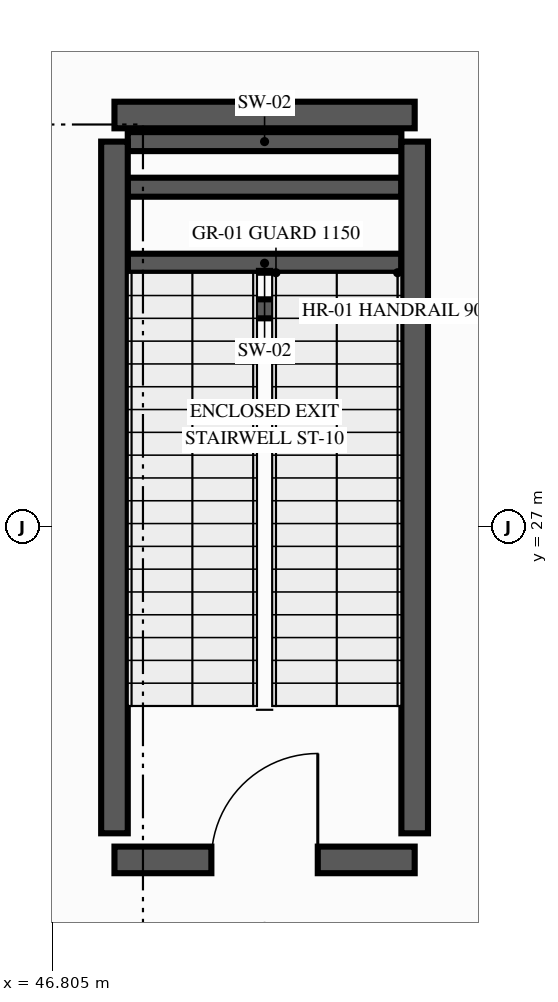
"""IFC4 building model, lengths in metres.
Left out: names, types, materials, properties, quantities, classifications, styles, units other than length and angle.
Written with IfcOpenShell. Run it as: python <this file> out.ifc"""

import sys

from ifc_helpers import new_model, si_unit, direction, frame, frame_2d, origin, place, context, subcontext, project, spatial, rectangle, extrude, element, fill, save


model = new_model("IFC4")
c1 = context("Model", 3, precision=1e-05, world=origin(), true_north=direction((0.0, 1.0)))
c2 = subcontext(c1, "Body", "Model", "MODEL_VIEW")
j1 = project(units=[si_unit("LENGTHUNIT", "METRE"), si_unit("PLANEANGLEUNIT", "RADIAN")], contexts=[c1])
p1 = place(None, origin())
s1 = spatial("IfcSite", under=j1, at=p1, CompositionType="ELEMENT")
p2 = place(p1, origin())
s2 = spatial("IfcBuilding", under=s1, at=p2, CompositionType="ELEMENT")
p3 = place(p2, frame((0.0, 0.0, -6.0)))
s3 = spatial("IfcBuildingStorey", under=s2, at=p3, CompositionType="ELEMENT", Elevation=-6.0)
for number, where, z_axis, x_axis in (
    (1, (47.8, 30.475, 0.0), (0.0, 0.0, 1.0), (1.0, 0.0, 0.0)),
    (2, (47.8, 32.075, 0.0), (0.0, 0.0, 1.0), (1.0, 0.0, 0.0)),
):
    element("IfcWall", number, at=place(p3, frame(where, z_axis=z_axis, x_axis=x_axis)), inside=s3, PredefinedType="SHEAR", context=c2, shape_type="SweptSolid", body=[
        extrude(rectangle(XDim=3.6, YDim=0.25, at=frame_2d((1.8, 0.0))), origin(), (0.0, 0.0, 1.0), 2.8),
    ])
for number, where, z_axis, x_axis in (
    (3, (47.8, 29.875, 0.0), (0.0, 0.0, 1.0), (1.0, 0.0, 0.0)),
    (4, (47.8, 31.475, 0.0), (0.0, 0.0, 1.0), (1.0, 0.0, 0.0)),
):
    element("IfcWall", number, at=place(p3, frame(where, z_axis=z_axis, x_axis=x_axis)), inside=s3, PredefinedType="SHEAR", context=c2, shape_type="SweptSolid", body=[
        extrude(rectangle(XDim=3.6, YDim=0.25, at=frame_2d((1.8, 0.0))), origin(), (0.0, 0.0, 1.0), 5.7),
    ])
p4 = place(p3, frame((47.625, 22.625, 0.0), z_axis=(0.0, 0.0, 1.0), x_axis=(1.0, 0.0, 0.0)))
e5 = element("IfcWall", 5, at=p4, inside=s3, PredefinedType="SHEAR", context=c2, shape_type="SweptSolid", body=[
    extrude(rectangle(XDim=3.95, YDim=0.35, at=frame_2d((1.975, 0.0))), origin(), (0.0, 0.0, 1.0), 5.7),
])
p5 = place(p4, frame((1.275, 0.0, 0.0)))
e6 = element("IfcOpeningElement", 6, at=p5, cuts=e5, PredefinedType="OPENING", context=c2, shape_type="SweptSolid", body=[
    extrude(rectangle(XDim=1.4, YDim=2.2, at=frame_2d((0.7, 1.1))), frame((0.0, 0.185, 0.0), z_axis=(0.0, -1.0, 0.0), x_axis=(1.0, 0.0, 0.0)), (0.0, 0.0, 1.0), 0.37),
])
p6 = place(p3, frame((47.625, 32.425, 0.0), z_axis=(0.0, 0.0, 1.0), x_axis=(1.0, 0.0, 0.0)))
e7 = element("IfcWall", 7, at=p6, inside=s3, PredefinedType="SHEAR", context=c2, shape_type="SweptSolid", body=[
    extrude(rectangle(XDim=3.95, YDim=0.35, at=frame_2d((1.975, 0.0))), origin(), (0.0, 0.0, 1.0), 5.7),
])
for number, where, z_axis, x_axis in (
    (8, (47.625, 22.975, 0.0), (0.0, 0.0, 1.0), (0.0, 1.0, 0.0)),
    (9, (51.575, 22.975, 0.0), (0.0, 0.0, 1.0), (0.0, 1.0, 0.0)),
):
    element("IfcWall", number, at=place(p3, frame(where, z_axis=z_axis, x_axis=x_axis)), inside=s3, PredefinedType="SHEAR", context=c2, shape_type="SweptSolid", body=[
        extrude(rectangle(XDim=9.1, YDim=0.35, at=frame_2d((4.55, 0.0))), origin(), (0.0, 0.0, 1.0), 5.7),
    ])
p7 = place(p5, origin())
e10 = element("IfcDoor", 10, at=p7, inside=s3, OperationType="SINGLE_SWING_RIGHT", PredefinedType="DOOR", context=c2, shape_type="SweptSolid", body=[
    extrude(rectangle(XDim=1.4, YDim=2.2, at=frame_2d((0.7, 1.1))), frame((0.0, 0.025, 0.0), z_axis=(0.0, -1.0, 0.0), x_axis=(1.0, 0.0, 0.0)), (0.0, 0.0, 1.0), 0.05),
])
fill(e6, e10)
save(model, sys.argv[1])
